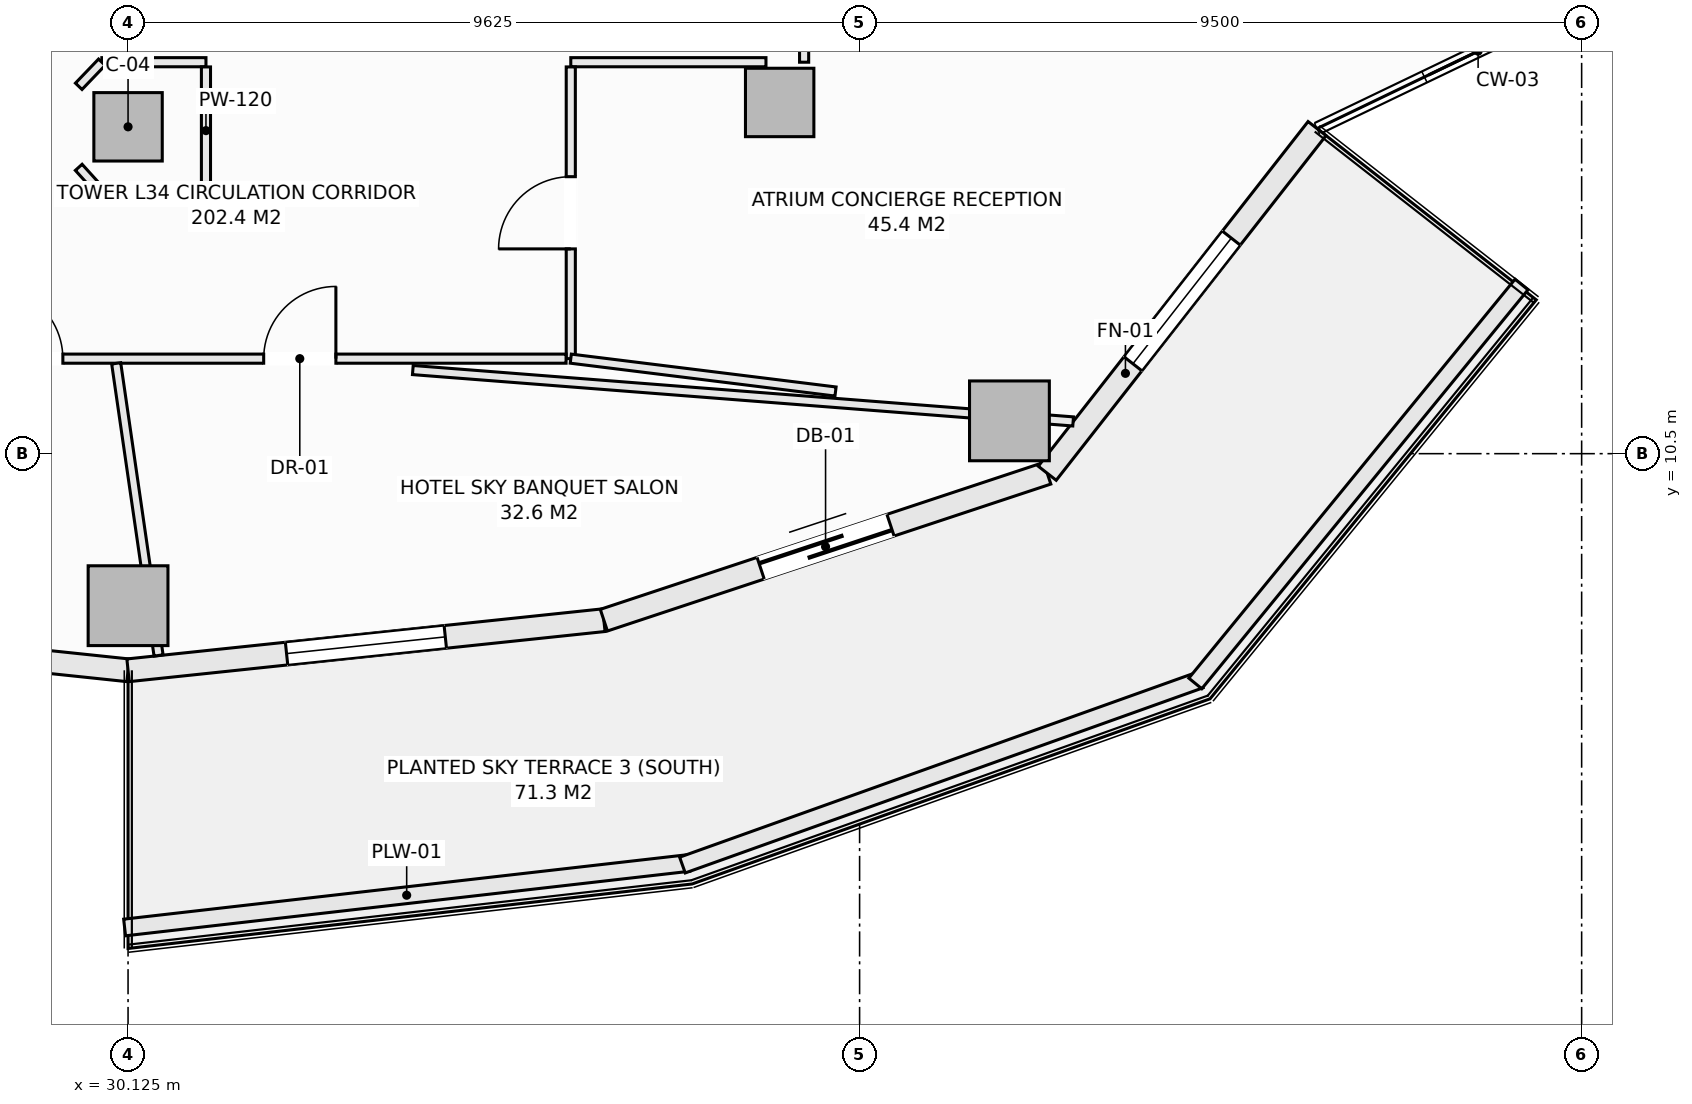
"""IFC4 building model, lengths in metres.
Left out: names, types, materials, properties, quantities, classifications, styles, units other than length and angle.
Written with IfcOpenShell. Run it as: python <this file> out.ifc"""

import sys

from ifc_helpers import new_model, si_unit, direction, frame, frame_2d, origin, origin_2d, place, context, subcontext, project, spatial, rectangle, extrude, element, fill, save


model = new_model("IFC4")
c1 = context("Model", 3, precision=1e-05, world=origin(), true_north=direction((0.0, 1.0)))
c2 = subcontext(c1, "Body", "Model", "MODEL_VIEW")
j1 = project(units=[si_unit("LENGTHUNIT", "METRE"), si_unit("PLANEANGLEUNIT", "RADIAN")], contexts=[c1])
p1 = place(None, origin())
s1 = spatial("IfcSite", under=j1, at=p1, CompositionType="ELEMENT")
p2 = place(p1, origin())
s2 = spatial("IfcBuilding", under=s1, at=p2, CompositionType="ELEMENT")
p3 = place(p2, frame((0.0, 0.0, 135.9)))
s3 = spatial("IfcBuildingStorey", under=s2, at=p3, CompositionType="ELEMENT", Elevation=135.9)
for number, where, z_axis, x_axis in (
    (1, (30.125, 8.5, -0.27), (0.0, 0.0, 1.0), (1.0, 0.0, 0.0)),
    (2, (41.721, 10.932, -0.27), (0.0, 0.0, 1.0), (1.0, 0.0, 0.0)),
):
    element("IfcColumn", number, at=place(p3, frame(where, z_axis=z_axis, x_axis=x_axis)), inside=s3, PredefinedType="COLUMN", context=c2, shape_type="SweptSolid", body=[
        extrude(rectangle(XDim=1.05, YDim=1.05, at=origin_2d()), origin(), (0.0, 0.0, 1.0), 3.4),
    ])
for number, where, z_axis, x_axis in (
    (3, (30.125, 14.8, -0.27), (0.0, 0.0, 1.0), (1.0, 0.0, 0.0)),
    (4, (38.698, 15.121, -0.27), (0.0, 0.0, 1.0), (1.0, 0.0, 0.0)),
):
    element("IfcColumn", number, at=place(p3, frame(where, z_axis=z_axis, x_axis=x_axis)), inside=s3, PredefinedType="COLUMN", context=c2, shape_type="SweptSolid", body=[
        extrude(rectangle(XDim=0.9, YDim=0.9, at=origin_2d()), origin(), (0.0, 0.0, 1.0), 3.4),
    ])
p4 = place(p3, frame((23.865, 8.309, 0.0), z_axis=(0.0, 0.0, 1.0), x_axis=(0.994498012394, -0.104755445421, 0.0)))
e5 = element("IfcWall", 5, at=p4, inside=s3, PredefinedType="SOLIDWALL", context=c2, shape_type="SweptSolid", body=[
    extrude(rectangle(XDim=6.295, YDim=0.3, at=frame_2d((3.147, 0.0))), origin(), (0.0, 0.0, 1.0), 2.653),
])
p5 = place(p4, frame((2.097, 0.0, 0.74)))
e6 = element("IfcOpeningElement", 6, at=p5, cuts=e5, PredefinedType="OPENING", context=c2, shape_type="SweptSolid", body=[
    extrude(rectangle(XDim=2.1, YDim=1.7, at=frame_2d((1.05, 0.85))), frame((0.0, 0.16, 0.0), z_axis=(0.0, -1.0, 0.0), x_axis=(1.0, 0.0, 0.0)), (0.0, 0.0, 1.0), 0.32),
])
p6 = place(p3, frame((30.125, 7.65, 0.0), z_axis=(0.0, 0.0, 1.0), x_axis=(0.994498012394, 0.104755445421, 0.0)))
e7 = element("IfcWall", 7, at=p6, inside=s3, PredefinedType="SOLIDWALL", context=c2, shape_type="SweptSolid", body=[
    extrude(rectangle(XDim=6.295, YDim=0.3, at=frame_2d((3.147, 0.0))), origin(), (0.0, 0.0, 1.0), 2.653),
])
p7 = place(p6, frame((2.097, 0.0, 0.74)))
e8 = element("IfcOpeningElement", 8, at=p7, cuts=e7, PredefinedType="OPENING", context=c2, shape_type="SweptSolid", body=[
    extrude(rectangle(XDim=2.1, YDim=1.7, at=frame_2d((1.05, 0.85))), frame((0.0, 0.16, 0.0), z_axis=(0.0, -1.0, 0.0), x_axis=(1.0, 0.0, 0.0)), (0.0, 0.0, 1.0), 0.32),
])
p8 = place(p3, frame((36.385, 8.309, 0.0), z_axis=(0.0, 0.0, 1.0), x_axis=(0.949238009374, 0.314558741032, 0.0)))
e9 = element("IfcWall", 9, at=p8, inside=s3, PredefinedType="SOLIDWALL", context=c2, shape_type="SweptSolid", body=[
    extrude(rectangle(XDim=6.146, YDim=0.3, at=frame_2d((3.073, 0.0))), origin(), (0.0, 0.0, 1.0), 2.653),
])
p9 = place(p8, frame((2.173, 0.0, 0.0)))
e10 = element("IfcOpeningElement", 10, at=p9, cuts=e9, PredefinedType="OPENING", context=c2, shape_type="SweptSolid", body=[
    extrude(rectangle(XDim=1.8, YDim=2.25, at=frame_2d((0.9, 1.125))), frame((0.0, 0.16, 0.0), z_axis=(0.0, -1.0, 0.0), x_axis=(1.0, 0.0, 0.0)), (0.0, 0.0, 1.0), 0.32),
])
p10 = place(p3, frame((42.219, 10.242, 0.0), z_axis=(0.0, 0.0, 1.0), x_axis=(0.616435134162, 0.787405693001, 0.0)))
e11 = element("IfcWall", 11, at=p10, inside=s3, PredefinedType="SOLIDWALL", context=c2, shape_type="SweptSolid", body=[
    extrude(rectangle(XDim=5.759, YDim=0.3, at=frame_2d((2.879, 0.0))), origin(), (0.0, 0.0, 1.0), 2.653),
])
p11 = place(p10, frame((1.829, 0.0, 0.74)))
e12 = element("IfcOpeningElement", 12, at=p11, cuts=e11, PredefinedType="OPENING", context=c2, shape_type="SweptSolid", body=[
    extrude(rectangle(XDim=2.1, YDim=1.7, at=frame_2d((1.05, 0.85))), frame((0.0, 0.16, 0.0), z_axis=(0.0, -1.0, 0.0), x_axis=(1.0, 0.0, 0.0)), (0.0, 0.0, 1.0), 0.32),
])
p12 = place(p3, frame((30.08, 4.266, 0.0), z_axis=(0.0, 0.0, 1.0), x_axis=(0.993527615836, 0.11359082961, 0.0)))
e13 = element("IfcWall", 13, at=p12, inside=s3, PredefinedType="PARAPET", context=c2, shape_type="SweptSolid", body=[
    extrude(rectangle(XDim=7.471, YDim=0.22, at=frame_2d((3.735, 0.0))), origin(), (0.0, 0.0, 1.0), 0.52),
])
p13 = place(p3, frame((37.419, 5.087, 0.0), z_axis=(0.0, 0.0, 1.0), x_axis=(0.941632697311, 0.336642040387, 0.0)))
e14 = element("IfcWall", 14, at=p13, inside=s3, PredefinedType="PARAPET", context=c2, shape_type="SweptSolid", body=[
    extrude(rectangle(XDim=7.236, YDim=0.22, at=frame_2d((3.618, 0.0))), origin(), (0.0, 0.0, 1.0), 0.52),
])
p14 = place(p3, frame((44.167, 7.477, 0.0), z_axis=(0.0, 0.0, 1.0), x_axis=(0.633002467947, 0.77414977593, 0.0)))
e15 = element("IfcWall", 15, at=p14, inside=s3, PredefinedType="PARAPET", context=c2, shape_type="SweptSolid", body=[
    extrude(rectangle(XDim=6.78, YDim=0.22, at=frame_2d((3.39, 0.0))), origin(), (0.0, 0.0, 1.0), 0.52),
])
p15 = place(p3, frame((39.02, 15.65, 0.0), z_axis=(0.0, 0.0, 1.0), x_axis=(0.0, 1.0, 0.0)))
e16 = element("IfcWall", 16, at=p15, inside=s3, PredefinedType="PARTITIONING", context=c2, shape_type="SweptSolid", body=[
    extrude(rectangle(XDim=1.36, YDim=0.12, at=frame_2d((0.68, 0.0))), origin(), (0.0, 0.0, 1.0), 2.505),
])
p16 = place(p3, frame((29.78, 15.65, 0.0), z_axis=(0.0, 0.0, 1.0), x_axis=(1.0, 0.0, 0.0)))
e17 = element("IfcWall", 17, at=p16, inside=s3, PredefinedType="PARTITIONING", context=c2, shape_type="SweptSolid", body=[
    extrude(rectangle(XDim=1.37, YDim=0.12, at=frame_2d((0.685, 0.0))), origin(), (0.0, 0.0, 1.0), 3.13),
])
p17 = place(p3, frame((35.95, 15.65, 0.0), z_axis=(0.0, 0.0, 1.0), x_axis=(1.0, 0.0, 0.0)))
e18 = element("IfcWall", 18, at=p17, inside=s3, PredefinedType="PARTITIONING", context=c2, shape_type="SweptSolid", body=[
    extrude(rectangle(XDim=2.568, YDim=0.12, at=frame_2d((1.284, 0.0))), origin(), (0.0, 0.0, 1.0), 3.13),
])
p18 = place(p3, frame((35.95, 11.75, 0.0), z_axis=(0.0, 0.0, 1.0), x_axis=(0.0, 1.0, 0.0)))
e19 = element("IfcWall", 19, at=p18, inside=s3, PredefinedType="PARTITIONING", context=c2, shape_type="SweptSolid", body=[
    extrude(rectangle(XDim=3.838, YDim=0.12, at=frame_2d((1.919, 0.0))), origin(), (0.0, 0.0, 1.0), 3.13),
])
p19 = place(p18, frame((1.444, 0.0, 0.0)))
e20 = element("IfcOpeningElement", 20, at=p19, cuts=e19, PredefinedType="OPENING", context=c2, shape_type="SweptSolid", body=[
    extrude(rectangle(XDim=0.95, YDim=2.1, at=frame_2d((0.475, 1.05))), frame((0.0, 0.07, 0.0), z_axis=(0.0, -1.0, 0.0), x_axis=(1.0, 0.0, 0.0)), (0.0, 0.0, 1.0), 0.14),
])
p20 = place(p3, frame((27.212, 11.75, 0.0), z_axis=(0.0, 0.0, 1.0), x_axis=(1.0, 0.0, 0.0)))
e21 = element("IfcWall", 21, at=p20, inside=s3, PredefinedType="PARTITIONING", context=c2, shape_type="SweptSolid", body=[
    extrude(rectangle(XDim=8.676, YDim=0.12, at=frame_2d((4.338, 0.0))), origin(), (0.0, 0.0, 1.0), 3.13),
])
p21 = place(p20, frame((1.105, 0.0, 0.0)))
e22 = element("IfcOpeningElement", 22, at=p21, cuts=e21, PredefinedType="OPENING", context=c2, shape_type="SweptSolid", body=[
    extrude(rectangle(XDim=0.95, YDim=2.1, at=frame_2d((0.475, 1.05))), frame((0.0, 0.07, 0.0), z_axis=(0.0, -1.0, 0.0), x_axis=(1.0, 0.0, 0.0)), (0.0, 0.0, 1.0), 0.14),
])
p22 = place(p20, frame((4.698, 0.0, 0.0)))
e23 = element("IfcOpeningElement", 23, at=p22, cuts=e21, PredefinedType="OPENING", context=c2, shape_type="SweptSolid", body=[
    extrude(rectangle(XDim=0.95, YDim=2.1, at=frame_2d((0.475, 1.05))), frame((0.0, 0.07, 0.0), z_axis=(0.0, -1.0, 0.0), x_axis=(1.0, 0.0, 0.0)), (0.0, 0.0, 1.0), 0.14),
])
p23 = place(p3, frame((29.476, 15.333, 0.0), z_axis=(0.0, 0.0, 1.0), x_axis=(0.692219273951, 0.721687243043, 0.0)))
e24 = element("IfcWall", 24, at=p23, inside=s3, PredefinedType="PARTITIONING", context=c2, shape_type="SweptSolid", body=[
    extrude(rectangle(XDim=0.439, YDim=0.12, at=frame_2d((0.22, 0.0))), origin(), (0.0, 0.0, 1.0), 3.13),
])
p24 = place(p3, frame((29.476, 14.267, 0.0), z_axis=(0.0, 0.0, 1.0), x_axis=(0.670659392016, -0.741765448037, 0.0)))
e25 = element("IfcWall", 25, at=p24, inside=s3, PredefinedType="PARTITIONING", context=c2, shape_type="SweptSolid", body=[
    extrude(rectangle(XDim=0.453, YDim=0.12, at=frame_2d((0.227, 0.0))), origin(), (0.0, 0.0, 1.0), 3.13),
])
p25 = place(p3, frame((29.78, 13.85, 0.0), z_axis=(0.0, 0.0, 1.0), x_axis=(1.0, 0.0, 0.0)))
e26 = element("IfcWall", 26, at=p25, inside=s3, PredefinedType="PARTITIONING", context=c2, shape_type="SweptSolid", body=[
    extrude(rectangle(XDim=1.37, YDim=0.12, at=frame_2d((0.685, 0.0))), origin(), (0.0, 0.0, 1.0), 3.13),
])
p26 = place(p3, frame((31.15, 13.912, 0.0), z_axis=(0.0, 0.0, 1.0), x_axis=(0.0, 1.0, 0.0)))
e27 = element("IfcWall", 27, at=p26, inside=s3, PredefinedType="PARTITIONING", context=c2, shape_type="SweptSolid", body=[
    extrude(rectangle(XDim=1.676, YDim=0.12, at=frame_2d((0.838, 0.0))), origin(), (0.0, 0.0, 1.0), 3.13),
])
p27 = place(p3, frame((33.872, 11.6, 0.0), z_axis=(0.0, 0.0, 1.0), x_axis=(0.996986194661, -0.077579170241, 0.0)))
e28 = element("IfcWall", 28, at=p27, inside=s3, PredefinedType="PARTITIONING", context=c2, shape_type="SweptSolid", body=[
    extrude(rectangle(XDim=8.714, YDim=0.12, at=frame_2d((4.357, 0.0))), origin(), (0.0, 0.0, 1.0), 2.653),
])
p28 = place(p3, frame((29.969, 11.688, 0.0), z_axis=(0.0, 0.0, 1.0), x_axis=(0.143603994305, -0.989635232204, 0.0)))
e29 = element("IfcWall", 29, at=p28, inside=s3, PredefinedType="PARTITIONING", context=c2, shape_type="SweptSolid", body=[
    extrude(rectangle(XDim=3.883, YDim=0.12, at=frame_2d((1.941, 0.0))), origin(), (0.0, 0.0, 1.0), 2.812),
])
p29 = place(p3, frame((35.95, 11.75, 0.0), z_axis=(0.0, 0.0, 1.0), x_axis=(0.992393012253, -0.123110150805, 0.0)))
e30 = element("IfcWall", 30, at=p29, inside=s3, PredefinedType="PARTITIONING", context=c2, shape_type="SweptSolid", body=[
    extrude(rectangle(XDim=3.51, YDim=0.12, at=frame_2d((1.755, 0.0))), origin(), (0.0, 0.0, 1.0), 3.13),
])
p30 = place(p7, origin())
e31 = element("IfcWindow", 31, at=p30, inside=s3, PartitioningType="SINGLE_PANEL", PredefinedType="WINDOW", context=c2, shape_type="SweptSolid", body=[
    extrude(rectangle(XDim=2.1, YDim=1.7, at=frame_2d((1.05, 0.85))), frame((0.0, 0.03, 0.0), z_axis=(0.0, -1.0, 0.0), x_axis=(1.0, 0.0, 0.0)), (0.0, 0.0, 1.0), 0.06),
])
fill(e8, e31)
p31 = place(p9, frame((1.8, 0.0, 0.0), z_axis=(0.0, 0.0, 1.0), x_axis=(-1.0, 0.0, 0.0)))
e32 = element("IfcDoor", 32, at=p31, inside=s3, OperationType="SLIDING_TO_LEFT", PredefinedType="DOOR", context=c2, shape_type="SweptSolid", body=[
    extrude(rectangle(XDim=1.8, YDim=2.25, at=frame_2d((0.9, 1.125))), frame((0.0, 0.025, 0.0), z_axis=(0.0, -1.0, 0.0), x_axis=(1.0, 0.0, 0.0)), (0.0, 0.0, 1.0), 0.05),
])
fill(e10, e32)
p32 = place(p11, origin())
e33 = element("IfcWindow", 33, at=p32, inside=s3, PartitioningType="SINGLE_PANEL", PredefinedType="WINDOW", context=c2, shape_type="SweptSolid", body=[
    extrude(rectangle(XDim=2.1, YDim=1.7, at=frame_2d((1.05, 0.85))), frame((0.0, 0.03, 0.0), z_axis=(0.0, -1.0, 0.0), x_axis=(1.0, 0.0, 0.0)), (0.0, 0.0, 1.0), 0.06),
])
fill(e12, e33)
p33 = place(p21, origin())
e34 = element("IfcDoor", 34, at=p33, inside=s3, OperationType="SINGLE_SWING_LEFT", PredefinedType="DOOR", context=c2, shape_type="SweptSolid", body=[
    extrude(rectangle(XDim=0.95, YDim=2.1, at=frame_2d((0.475, 1.05))), frame((0.0, 0.025, 0.0), z_axis=(0.0, -1.0, 0.0), x_axis=(1.0, 0.0, 0.0)), (0.0, 0.0, 1.0), 0.05),
])
fill(e22, e34)
p34 = place(p22, origin())
e35 = element("IfcDoor", 35, at=p34, inside=s3, OperationType="SINGLE_SWING_RIGHT", PredefinedType="DOOR", context=c2, shape_type="SweptSolid", body=[
    extrude(rectangle(XDim=0.95, YDim=2.1, at=frame_2d((0.475, 1.05))), frame((0.0, 0.025, 0.0), z_axis=(0.0, -1.0, 0.0), x_axis=(1.0, 0.0, 0.0)), (0.0, 0.0, 1.0), 0.05),
])
fill(e23, e35)
p35 = place(p19, origin())
e36 = element("IfcDoor", 36, at=p35, inside=s3, OperationType="SINGLE_SWING_LEFT", PredefinedType="DOOR", context=c2, shape_type="SweptSolid", body=[
    extrude(rectangle(XDim=0.95, YDim=2.1, at=frame_2d((0.475, 1.05))), frame((0.0, 0.025, 0.0), z_axis=(0.0, -1.0, 0.0), x_axis=(1.0, 0.0, 0.0)), (0.0, 0.0, 1.0), 0.05),
])
fill(e20, e36)
save(model, sys.argv[1])
